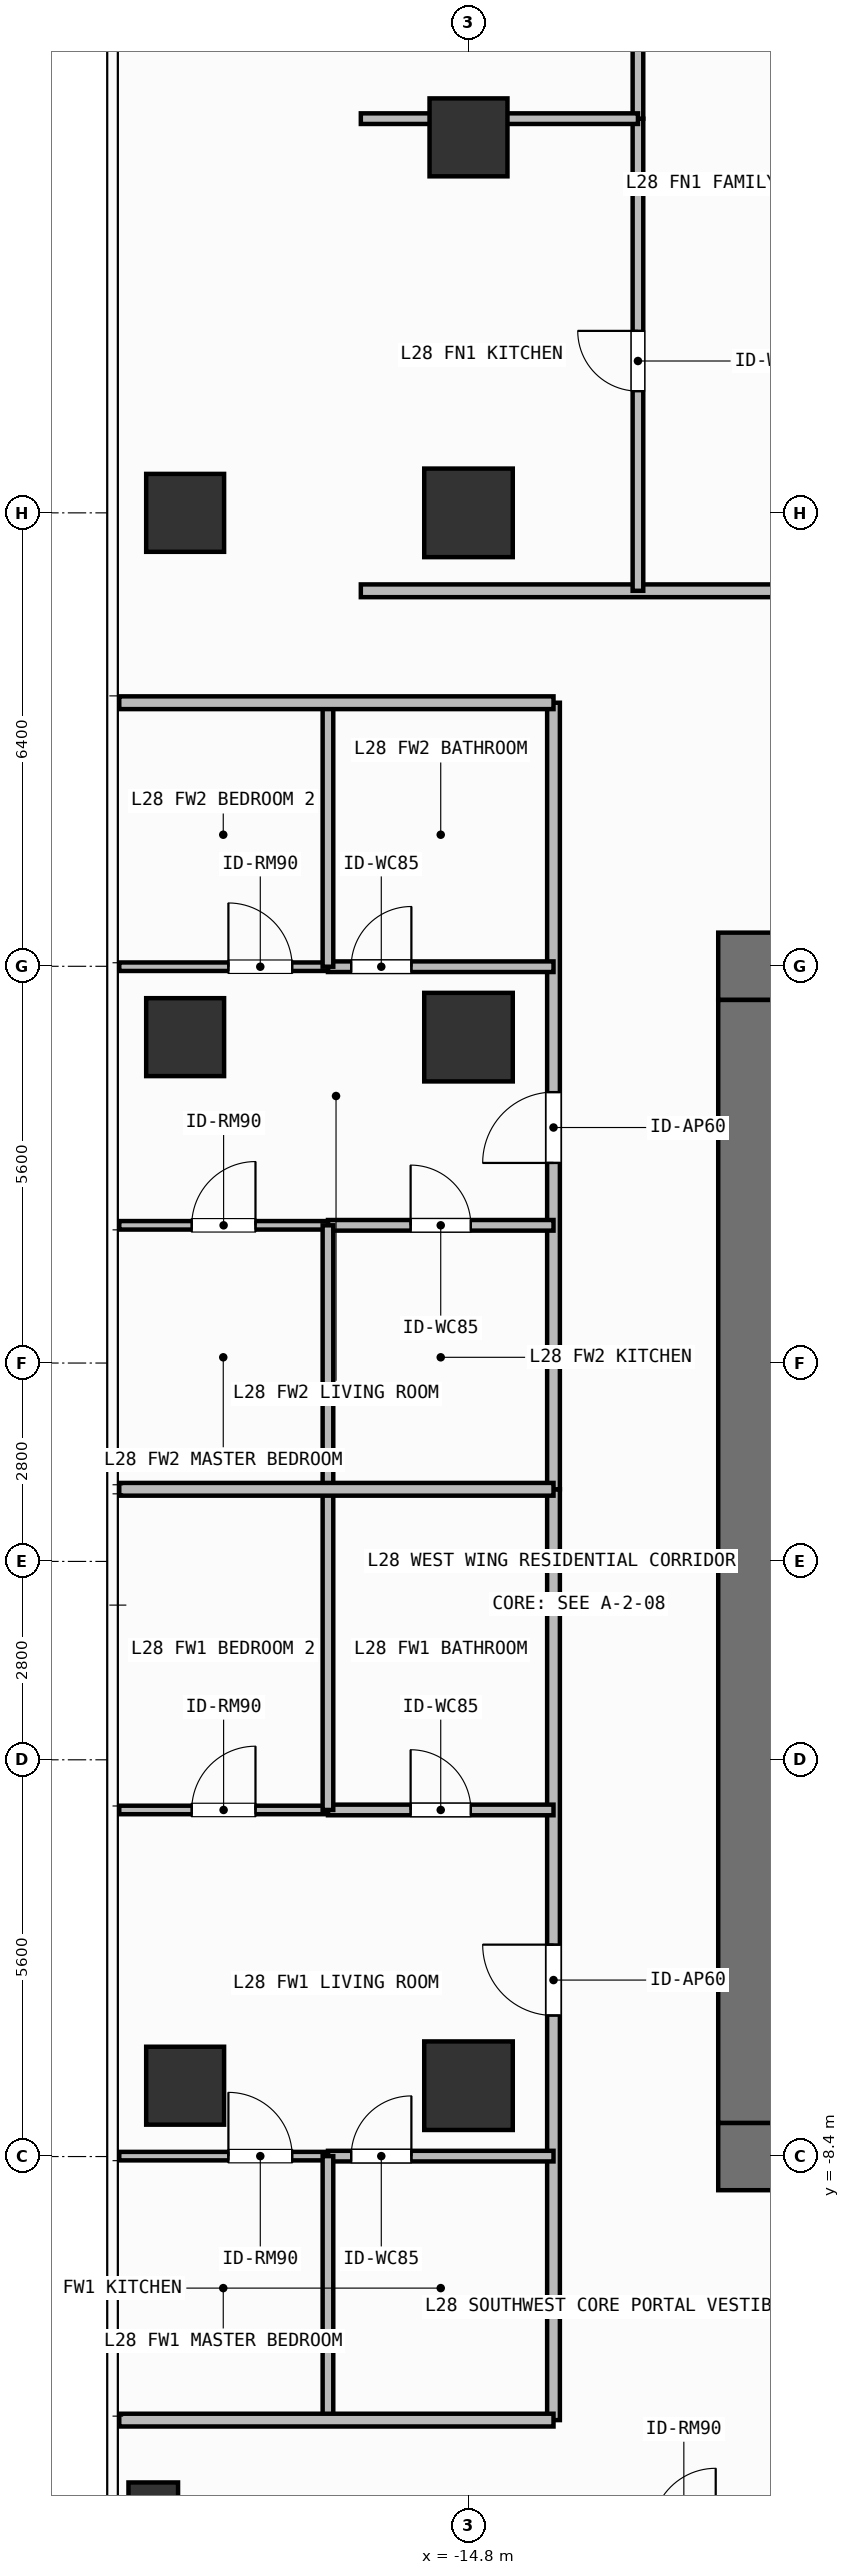
"""IFC4 building model, lengths in metres.
Left out: names, types, materials, properties, quantities, classifications, styles, units other than length and angle.
Written with IfcOpenShell. Run it as: python <this file> out.ifc"""

import sys

from ifc_helpers import new_model, si_unit, direction, frame, frame_2d, origin, origin_2d, place, context, subcontext, project, spatial, rectangle, hollow_rectangle, extrude, element, fill, save


model = new_model("IFC4")
c1 = context("Model", 3, precision=1e-05, world=origin(), true_north=direction((0.0, 1.0)))
c2 = subcontext(c1, "Body", "Model", "MODEL_VIEW")
j1 = project(units=[si_unit("LENGTHUNIT", "METRE"), si_unit("PLANEANGLEUNIT", "RADIAN")], contexts=[c1])
p1 = place(None, origin())
s1 = spatial("IfcSite", under=j1, at=p1, CompositionType="ELEMENT")
p2 = place(p1, origin())
s2 = spatial("IfcBuilding", under=s1, at=p2, CompositionType="ELEMENT")
p3 = place(p2, frame((0.0, 0.0, 113.4)))
s3 = spatial("IfcBuildingStorey", under=s2, at=p3, CompositionType="ELEMENT", Elevation=113.4)
for number, where, z_axis, x_axis in (
    (1, (-11.275, -8.4, 0.0), (0.0, 0.0, 1.0), (1.0, 0.0, 0.0)),
    (2, (-11.275, 8.4, 0.0), (0.0, 0.0, 1.0), (1.0, 0.0, 0.0)),
):
    element("IfcWall", number, at=place(p3, frame(where, z_axis=z_axis, x_axis=x_axis)), inside=s3, PredefinedType="SHEAR", context=c2, shape_type="SweptSolid", body=[
        extrude(rectangle(XDim=1.575, YDim=0.95, at=frame_2d((0.788, 0.0))), origin(), (0.0, 0.0, 1.0), 3.9),
    ])
p4 = place(p3, frame((-10.8, -7.925, 0.0), z_axis=(0.0, 0.0, 1.0), x_axis=(0.0, 1.0, 0.0)))
e3 = element("IfcWall", 3, at=p4, inside=s3, PredefinedType="SHEAR", context=c2, shape_type="SweptSolid", body=[
    extrude(rectangle(XDim=15.85, YDim=0.95, at=frame_2d((7.925, 0.0))), origin(), (0.0, 0.0, 1.0), 3.9),
])
for number, where, z_axis, x_axis in (
    (4, (-14.8, 14.8, 0.0), (0.0, 0.0, 1.0), (1.0, 0.0, 0.0)),
    (5, (-14.8, -7.4, 0.0), (0.0, 0.0, 1.0), (1.0, 0.0, 0.0)),
    (6, (-14.8, 7.4, 0.0), (0.0, 0.0, 1.0), (1.0, 0.0, 0.0)),
):
    element("IfcColumn", number, at=place(p3, frame(where, z_axis=z_axis, x_axis=x_axis)), inside=s3, PredefinedType="COLUMN", context=c2, shape_type="SweptSolid", body=[
        extrude(rectangle(XDim=1.25, YDim=1.25, at=origin_2d()), origin(), (0.0, 0.0, 1.0), 3.9),
    ])
for number, where, z_axis, x_axis in (
    (7, (-18.8, -7.4, 0.0), (0.0, 0.0, 1.0), (1.0, 0.0, 0.0)),
    (8, (-18.8, 7.4, 0.0), (0.0, 0.0, 1.0), (1.0, 0.0, 0.0)),
    (9, (-18.8, 14.8, 0.0), (0.0, 0.0, 1.0), (1.0, 0.0, 0.0)),
    (10, (-14.8, 20.1, 0.0), (0.0, 0.0, 1.0), (1.0, 0.0, 0.0)),
):
    element("IfcColumn", number, at=place(p3, frame(where, z_axis=z_axis, x_axis=x_axis)), inside=s3, PredefinedType="COLUMN", context=c2, shape_type="SweptSolid", body=[
        extrude(rectangle(XDim=1.1, YDim=1.1, at=origin_2d()), origin(), (0.0, 0.0, 1.0), 3.9),
    ])
p5 = place(p3, frame((-19.25, -13.35, 0.0), z_axis=(0.0, 0.0, 1.0), x_axis=(1.0, 0.0, 0.0)))
e11 = element("IfcColumn", 11, at=p5, inside=s3, PredefinedType="COLUMN", context=c2, shape_type="SweptSolid", body=[
    extrude(hollow_rectangle(XDim=0.7, YDim=0.7, WallThickness=0.032, at=origin_2d()), origin(), (0.0, 0.0, 1.0), 3.9),
])
p6 = place(p3, frame((-16.32, 13.7, 0.0), z_axis=(0.0, 0.0, 1.0), x_axis=(1.0, 0.0, 0.0)))
e12 = element("IfcWall", 12, at=p6, inside=s3, PredefinedType="PARTITIONING", context=c2, shape_type="SweptSolid", body=[
    extrude(rectangle(XDim=12.941, YDim=0.18, at=frame_2d((6.471, 0.0))), origin(), (0.0, 0.0, 1.0), 3.68),
])
p7 = place(p6, frame((6.417, 0.0, 0.0)))
e13 = element("IfcOpeningElement", 13, at=p7, cuts=e12, PredefinedType="OPENING", context=c2, shape_type="SweptSolid", body=[
    extrude(rectangle(XDim=1.0, YDim=2.2, at=frame_2d((0.5, 1.1))), frame((0.0, 0.1, 0.0), z_axis=(0.0, -1.0, 0.0), x_axis=(1.0, 0.0, 0.0)), (0.0, 0.0, 1.0), 0.2),
])
p8 = place(p3, frame((-12.408, 13.7, 0.0), z_axis=(0.0, 0.0, 1.0), x_axis=(0.0, 1.0, 0.0)))
e14 = element("IfcWall", 14, at=p8, inside=s3, PredefinedType="PARTITIONING", context=c2, shape_type="SweptSolid", body=[
    extrude(rectangle(XDim=6.664, YDim=0.15, at=frame_2d((3.332, 0.0))), origin(), (0.0, 0.0, 1.0), 3.68),
])
p9 = place(p8, frame((2.818, 0.0, 0.0)))
e15 = element("IfcOpeningElement", 15, at=p9, cuts=e14, PredefinedType="OPENING", context=c2, shape_type="SweptSolid", body=[
    extrude(rectangle(XDim=0.85, YDim=2.1, at=frame_2d((0.425, 1.05))), frame((0.0, 0.085, 0.0), z_axis=(0.0, -1.0, 0.0), x_axis=(1.0, 0.0, 0.0)), (0.0, 0.0, 1.0), 0.17),
])
p10 = place(p3, frame((-12.408, 20.364, 0.0), z_axis=(0.0, 0.0, 1.0), x_axis=(0.0, 1.0, 0.0)))
e16 = element("IfcWall", 16, at=p10, inside=s3, PredefinedType="PARTITIONING", context=c2, shape_type="SweptSolid", body=[
    extrude(rectangle(XDim=4.826, YDim=0.15, at=frame_2d((2.413, 0.0))), origin(), (0.0, 0.0, 1.0), 3.68),
])
p11 = place(p10, frame((1.901, 0.0, 0.0)))
e17 = element("IfcOpeningElement", 17, at=p11, cuts=e16, PredefinedType="OPENING", context=c2, shape_type="SweptSolid", body=[
    extrude(rectangle(XDim=0.85, YDim=2.1, at=frame_2d((0.425, 1.05))), frame((0.0, 0.085, 0.0), z_axis=(0.0, -1.0, 0.0), x_axis=(1.0, 0.0, 0.0)), (0.0, 0.0, 1.0), 0.17),
])
p12 = place(p3, frame((-13.6, -12.12, 0.0), z_axis=(0.0, 0.0, 1.0), x_axis=(0.0, 1.0, 0.0)))
e18 = element("IfcWall", 18, at=p12, inside=s3, PredefinedType="PARTITIONING", context=c2, shape_type="SweptSolid", body=[
    extrude(rectangle(XDim=13.138, YDim=0.18, at=frame_2d((6.569, 0.0))), origin(), (0.0, 0.0, 1.0), 3.68),
])
p13 = place(p12, frame((5.711, 0.0, 0.0)))
e19 = element("IfcOpeningElement", 19, at=p13, cuts=e18, PredefinedType="OPENING", context=c2, shape_type="SweptSolid", body=[
    extrude(rectangle(XDim=1.0, YDim=2.2, at=frame_2d((0.5, 1.1))), frame((0.0, 0.1, 0.0), z_axis=(0.0, -1.0, 0.0), x_axis=(1.0, 0.0, 0.0)), (0.0, 0.0, 1.0), 0.2),
])
p14 = place(p3, frame((-16.784, -3.508, 0.0), z_axis=(0.0, 0.0, 1.0), x_axis=(1.0, 0.0, 0.0)))
e20 = element("IfcWall", 20, at=p14, inside=s3, PredefinedType="PARTITIONING", context=c2, shape_type="SweptSolid", body=[
    extrude(rectangle(XDim=3.184, YDim=0.15, at=frame_2d((1.592, 0.0))), origin(), (0.0, 0.0, 1.0), 3.68),
])
p15 = place(p14, frame((1.167, 0.0, 0.0)))
e21 = element("IfcOpeningElement", 21, at=p15, cuts=e20, PredefinedType="OPENING", context=c2, shape_type="SweptSolid", body=[
    extrude(rectangle(XDim=0.85, YDim=2.1, at=frame_2d((0.425, 1.05))), frame((0.0, 0.085, 0.0), z_axis=(0.0, -1.0, 0.0), x_axis=(1.0, 0.0, 0.0)), (0.0, 0.0, 1.0), 0.17),
])
p16 = place(p3, frame((-16.784, -8.394, 0.0), z_axis=(0.0, 0.0, 1.0), x_axis=(1.0, 0.0, 0.0)))
e22 = element("IfcWall", 22, at=p16, inside=s3, PredefinedType="PARTITIONING", context=c2, shape_type="SweptSolid", body=[
    extrude(rectangle(XDim=3.184, YDim=0.15, at=frame_2d((1.592, 0.0))), origin(), (0.0, 0.0, 1.0), 3.68),
])
p17 = place(p16, frame((0.328, 0.0, 0.0)))
e23 = element("IfcOpeningElement", 23, at=p17, cuts=e22, PredefinedType="OPENING", context=c2, shape_type="SweptSolid", body=[
    extrude(rectangle(XDim=0.85, YDim=2.1, at=frame_2d((0.425, 1.05))), frame((0.0, 0.085, 0.0), z_axis=(0.0, -1.0, 0.0), x_axis=(1.0, 0.0, 0.0)), (0.0, 0.0, 1.0), 0.17),
])
p18 = place(p3, frame((-19.73, -8.394, 0.0), z_axis=(0.0, 0.0, 1.0), x_axis=(1.0, 0.0, 0.0)))
e24 = element("IfcWall", 24, at=p18, inside=s3, PredefinedType="PARTITIONING", context=c2, shape_type="SweptSolid", body=[
    extrude(rectangle(XDim=2.946, YDim=0.12, at=frame_2d((1.473, 0.0))), origin(), (0.0, 0.0, 1.0), 3.68),
])
p19 = place(p18, frame((1.541, 0.0, 0.0)))
e25 = element("IfcOpeningElement", 25, at=p19, cuts=e24, PredefinedType="OPENING", context=c2, shape_type="SweptSolid", body=[
    extrude(rectangle(XDim=0.9, YDim=2.1, at=frame_2d((0.45, 1.05))), frame((0.0, 0.07, 0.0), z_axis=(0.0, -1.0, 0.0), x_axis=(1.0, 0.0, 0.0)), (0.0, 0.0, 1.0), 0.14),
])
p20 = place(p3, frame((-19.73, -3.508, 0.0), z_axis=(0.0, 0.0, 1.0), x_axis=(1.0, 0.0, 0.0)))
e26 = element("IfcWall", 26, at=p20, inside=s3, PredefinedType="PARTITIONING", context=c2, shape_type="SweptSolid", body=[
    extrude(rectangle(XDim=2.946, YDim=0.12, at=frame_2d((1.473, 0.0))), origin(), (0.0, 0.0, 1.0), 3.68),
])
p21 = place(p20, frame((1.023, 0.0, 0.0)))
e27 = element("IfcOpeningElement", 27, at=p21, cuts=e26, PredefinedType="OPENING", context=c2, shape_type="SweptSolid", body=[
    extrude(rectangle(XDim=0.9, YDim=2.1, at=frame_2d((0.45, 1.05))), frame((0.0, 0.07, 0.0), z_axis=(0.0, -1.0, 0.0), x_axis=(1.0, 0.0, 0.0)), (0.0, 0.0, 1.0), 0.14),
])
p22 = place(p3, frame((-13.6, 1.018, 0.0), z_axis=(0.0, 0.0, 1.0), x_axis=(0.0, 1.0, 0.0)))
e28 = element("IfcWall", 28, at=p22, inside=s3, PredefinedType="PARTITIONING", context=c2, shape_type="SweptSolid", body=[
    extrude(rectangle(XDim=11.102, YDim=0.18, at=frame_2d((5.551, 0.0))), origin(), (0.0, 0.0, 1.0), 3.68),
])
p23 = place(p22, frame((4.606, 0.0, 0.0)))
e29 = element("IfcOpeningElement", 29, at=p23, cuts=e28, PredefinedType="OPENING", context=c2, shape_type="SweptSolid", body=[
    extrude(rectangle(XDim=1.0, YDim=2.2, at=frame_2d((0.5, 1.1))), frame((0.0, 0.1, 0.0), z_axis=(0.0, -1.0, 0.0), x_axis=(1.0, 0.0, 0.0)), (0.0, 0.0, 1.0), 0.2),
])
p24 = place(p3, frame((-16.784, 8.394, 0.0), z_axis=(0.0, 0.0, 1.0), x_axis=(1.0, 0.0, 0.0)))
e30 = element("IfcWall", 30, at=p24, inside=s3, PredefinedType="PARTITIONING", context=c2, shape_type="SweptSolid", body=[
    extrude(rectangle(XDim=3.184, YDim=0.15, at=frame_2d((1.592, 0.0))), origin(), (0.0, 0.0, 1.0), 3.68),
])
p25 = place(p24, frame((0.328, 0.0, 0.0)))
e31 = element("IfcOpeningElement", 31, at=p25, cuts=e30, PredefinedType="OPENING", context=c2, shape_type="SweptSolid", body=[
    extrude(rectangle(XDim=0.85, YDim=2.1, at=frame_2d((0.425, 1.05))), frame((0.0, 0.085, 0.0), z_axis=(0.0, -1.0, 0.0), x_axis=(1.0, 0.0, 0.0)), (0.0, 0.0, 1.0), 0.17),
])
p26 = place(p3, frame((-16.784, 4.744, 0.0), z_axis=(0.0, 0.0, 1.0), x_axis=(1.0, 0.0, 0.0)))
e32 = element("IfcWall", 32, at=p26, inside=s3, PredefinedType="PARTITIONING", context=c2, shape_type="SweptSolid", body=[
    extrude(rectangle(XDim=3.184, YDim=0.15, at=frame_2d((1.592, 0.0))), origin(), (0.0, 0.0, 1.0), 3.68),
])
p27 = place(p26, frame((1.167, 0.0, 0.0)))
e33 = element("IfcOpeningElement", 33, at=p27, cuts=e32, PredefinedType="OPENING", context=c2, shape_type="SweptSolid", body=[
    extrude(rectangle(XDim=0.85, YDim=2.1, at=frame_2d((0.425, 1.05))), frame((0.0, 0.085, 0.0), z_axis=(0.0, -1.0, 0.0), x_axis=(1.0, 0.0, 0.0)), (0.0, 0.0, 1.0), 0.17),
])
p28 = place(p3, frame((-19.73, 4.744, 0.0), z_axis=(0.0, 0.0, 1.0), x_axis=(1.0, 0.0, 0.0)))
e34 = element("IfcWall", 34, at=p28, inside=s3, PredefinedType="PARTITIONING", context=c2, shape_type="SweptSolid", body=[
    extrude(rectangle(XDim=2.946, YDim=0.12, at=frame_2d((1.473, 0.0))), origin(), (0.0, 0.0, 1.0), 3.68),
])
p29 = place(p28, frame((1.023, 0.0, 0.0)))
e35 = element("IfcOpeningElement", 35, at=p29, cuts=e34, PredefinedType="OPENING", context=c2, shape_type="SweptSolid", body=[
    extrude(rectangle(XDim=0.9, YDim=2.1, at=frame_2d((0.45, 1.05))), frame((0.0, 0.07, 0.0), z_axis=(0.0, -1.0, 0.0), x_axis=(1.0, 0.0, 0.0)), (0.0, 0.0, 1.0), 0.14),
])
p30 = place(p3, frame((-19.73, 8.394, 0.0), z_axis=(0.0, 0.0, 1.0), x_axis=(1.0, 0.0, 0.0)))
e36 = element("IfcWall", 36, at=p30, inside=s3, PredefinedType="PARTITIONING", context=c2, shape_type="SweptSolid", body=[
    extrude(rectangle(XDim=2.946, YDim=0.12, at=frame_2d((1.473, 0.0))), origin(), (0.0, 0.0, 1.0), 3.68),
])
p31 = place(p30, frame((1.541, 0.0, 0.0)))
e37 = element("IfcOpeningElement", 37, at=p31, cuts=e36, PredefinedType="OPENING", context=c2, shape_type="SweptSolid", body=[
    extrude(rectangle(XDim=0.9, YDim=2.1, at=frame_2d((0.45, 1.05))), frame((0.0, 0.07, 0.0), z_axis=(0.0, -1.0, 0.0), x_axis=(1.0, 0.0, 0.0)), (0.0, 0.0, 1.0), 0.14),
])
p32 = place(p3, frame((-16.32, 20.364, 0.0), z_axis=(0.0, 0.0, 1.0), x_axis=(1.0, 0.0, 0.0)))
e38 = element("IfcWall", 38, at=p32, inside=s3, PredefinedType="PARTITIONING", context=c2, shape_type="SweptSolid", body=[
    extrude(rectangle(XDim=3.912, YDim=0.15, at=frame_2d((1.956, 0.0))), origin(), (0.0, 0.0, 1.0), 3.082),
])
p33 = place(p3, frame((-16.784, -12.12, 0.0), z_axis=(0.0, 0.0, 1.0), x_axis=(0.0, 1.0, 0.0)))
e39 = element("IfcWall", 39, at=p33, inside=s3, PredefinedType="PARTITIONING", context=c2, shape_type="SweptSolid", body=[
    extrude(rectangle(XDim=3.726, YDim=0.15, at=frame_2d((1.863, 0.0))), origin(), (0.0, 0.0, 1.0), 3.68),
])
p34 = place(p3, frame((-16.784, -3.508, 0.0), z_axis=(0.0, 0.0, 1.0), x_axis=(0.0, 1.0, 0.0)))
e40 = element("IfcWall", 40, at=p34, inside=s3, PredefinedType="PARTITIONING", context=c2, shape_type="SweptSolid", body=[
    extrude(rectangle(XDim=4.526, YDim=0.15, at=frame_2d((2.263, 0.0))), origin(), (0.0, 0.0, 1.0), 3.68),
])
p35 = place(p3, frame((-16.784, 1.018, 0.0), z_axis=(0.0, 0.0, 1.0), x_axis=(0.0, 1.0, 0.0)))
e41 = element("IfcWall", 41, at=p35, inside=s3, PredefinedType="PARTITIONING", context=c2, shape_type="SweptSolid", body=[
    extrude(rectangle(XDim=3.726, YDim=0.15, at=frame_2d((1.863, 0.0))), origin(), (0.0, 0.0, 1.0), 3.68),
])
p36 = place(p3, frame((-16.784, 8.394, 0.0), z_axis=(0.0, 0.0, 1.0), x_axis=(0.0, 1.0, 0.0)))
e42 = element("IfcWall", 42, at=p36, inside=s3, PredefinedType="PARTITIONING", context=c2, shape_type="SweptSolid", body=[
    extrude(rectangle(XDim=3.726, YDim=0.15, at=frame_2d((1.863, 0.0))), origin(), (0.0, 0.0, 1.0), 3.68),
])
for number, where, z_axis, x_axis in (
    (43, (-19.73, 1.018, 0.0), (0.0, 0.0, 1.0), (1.0, 0.0, 0.0)),
    (44, (-19.73, -12.12, 0.0), (0.0, 0.0, 1.0), (1.0, 0.0, 0.0)),
    (45, (-19.73, 12.12, 0.0), (0.0, 0.0, 1.0), (1.0, 0.0, 0.0)),
):
    element("IfcWall", number, at=place(p3, frame(where, z_axis=z_axis, x_axis=x_axis)), inside=s3, PredefinedType="PARTITIONING", context=c2, shape_type="SweptSolid", body=[
        extrude(rectangle(XDim=6.13, YDim=0.18, at=frame_2d((3.065, 0.0))), origin(), (0.0, 0.0, 1.0), 3.68),
    ])
p37 = place(p9, origin())
e46 = element("IfcDoor", 46, at=p37, inside=s3, OperationType="SINGLE_SWING_RIGHT", PredefinedType="DOOR", context=c2, shape_type="SweptSolid", body=[
    extrude(rectangle(XDim=0.85, YDim=2.1, at=frame_2d((0.425, 1.05))), frame((0.0, 0.025, 0.0), z_axis=(0.0, -1.0, 0.0), x_axis=(1.0, 0.0, 0.0)), (0.0, 0.0, 1.0), 0.05),
])
fill(e15, e46)
p38 = place(p13, origin())
e47 = element("IfcDoor", 47, at=p38, inside=s3, OperationType="SINGLE_SWING_RIGHT", PredefinedType="DOOR", context=c2, shape_type="SweptSolid", body=[
    extrude(rectangle(XDim=1.0, YDim=2.2, at=frame_2d((0.5, 1.1))), frame((0.0, 0.025, 0.0), z_axis=(0.0, -1.0, 0.0), x_axis=(1.0, 0.0, 0.0)), (0.0, 0.0, 1.0), 0.05),
])
fill(e19, e47)
p39 = place(p15, origin())
e48 = element("IfcDoor", 48, at=p39, inside=s3, OperationType="SINGLE_SWING_LEFT", PredefinedType="DOOR", context=c2, shape_type="SweptSolid", body=[
    extrude(rectangle(XDim=0.85, YDim=2.1, at=frame_2d((0.425, 1.05))), frame((0.0, 0.025, 0.0), z_axis=(0.0, -1.0, 0.0), x_axis=(1.0, 0.0, 0.0)), (0.0, 0.0, 1.0), 0.05),
])
fill(e21, e48)
p40 = place(p17, origin())
e49 = element("IfcDoor", 49, at=p40, inside=s3, OperationType="SINGLE_SWING_RIGHT", PredefinedType="DOOR", context=c2, shape_type="SweptSolid", body=[
    extrude(rectangle(XDim=0.85, YDim=2.1, at=frame_2d((0.425, 1.05))), frame((0.0, 0.025, 0.0), z_axis=(0.0, -1.0, 0.0), x_axis=(1.0, 0.0, 0.0)), (0.0, 0.0, 1.0), 0.05),
])
fill(e23, e49)
p41 = place(p19, origin())
e50 = element("IfcDoor", 50, at=p41, inside=s3, OperationType="SINGLE_SWING_LEFT", PredefinedType="DOOR", context=c2, shape_type="SweptSolid", body=[
    extrude(rectangle(XDim=0.9, YDim=2.1, at=frame_2d((0.45, 1.05))), frame((0.0, 0.025, 0.0), z_axis=(0.0, -1.0, 0.0), x_axis=(1.0, 0.0, 0.0)), (0.0, 0.0, 1.0), 0.05),
])
fill(e25, e50)
p42 = place(p21, origin())
e51 = element("IfcDoor", 51, at=p42, inside=s3, OperationType="SINGLE_SWING_RIGHT", PredefinedType="DOOR", context=c2, shape_type="SweptSolid", body=[
    extrude(rectangle(XDim=0.9, YDim=2.1, at=frame_2d((0.45, 1.05))), frame((0.0, 0.025, 0.0), z_axis=(0.0, -1.0, 0.0), x_axis=(1.0, 0.0, 0.0)), (0.0, 0.0, 1.0), 0.05),
])
fill(e27, e51)
p43 = place(p23, origin())
e52 = element("IfcDoor", 52, at=p43, inside=s3, OperationType="SINGLE_SWING_LEFT", PredefinedType="DOOR", context=c2, shape_type="SweptSolid", body=[
    extrude(rectangle(XDim=1.0, YDim=2.2, at=frame_2d((0.5, 1.1))), frame((0.0, 0.025, 0.0), z_axis=(0.0, -1.0, 0.0), x_axis=(1.0, 0.0, 0.0)), (0.0, 0.0, 1.0), 0.05),
])
fill(e29, e52)
p44 = place(p25, origin())
e53 = element("IfcDoor", 53, at=p44, inside=s3, OperationType="SINGLE_SWING_RIGHT", PredefinedType="DOOR", context=c2, shape_type="SweptSolid", body=[
    extrude(rectangle(XDim=0.85, YDim=2.1, at=frame_2d((0.425, 1.05))), frame((0.0, 0.025, 0.0), z_axis=(0.0, -1.0, 0.0), x_axis=(1.0, 0.0, 0.0)), (0.0, 0.0, 1.0), 0.05),
])
fill(e31, e53)
p45 = place(p27, origin())
e54 = element("IfcDoor", 54, at=p45, inside=s3, OperationType="SINGLE_SWING_LEFT", PredefinedType="DOOR", context=c2, shape_type="SweptSolid", body=[
    extrude(rectangle(XDim=0.85, YDim=2.1, at=frame_2d((0.425, 1.05))), frame((0.0, 0.025, 0.0), z_axis=(0.0, -1.0, 0.0), x_axis=(1.0, 0.0, 0.0)), (0.0, 0.0, 1.0), 0.05),
])
fill(e33, e54)
p46 = place(p29, origin())
e55 = element("IfcDoor", 55, at=p46, inside=s3, OperationType="SINGLE_SWING_RIGHT", PredefinedType="DOOR", context=c2, shape_type="SweptSolid", body=[
    extrude(rectangle(XDim=0.9, YDim=2.1, at=frame_2d((0.45, 1.05))), frame((0.0, 0.025, 0.0), z_axis=(0.0, -1.0, 0.0), x_axis=(1.0, 0.0, 0.0)), (0.0, 0.0, 1.0), 0.05),
])
fill(e35, e55)
p47 = place(p31, origin())
e56 = element("IfcDoor", 56, at=p47, inside=s3, OperationType="SINGLE_SWING_LEFT", PredefinedType="DOOR", context=c2, shape_type="SweptSolid", body=[
    extrude(rectangle(XDim=0.9, YDim=2.1, at=frame_2d((0.45, 1.05))), frame((0.0, 0.025, 0.0), z_axis=(0.0, -1.0, 0.0), x_axis=(1.0, 0.0, 0.0)), (0.0, 0.0, 1.0), 0.05),
])
fill(e37, e56)
save(model, sys.argv[1])
